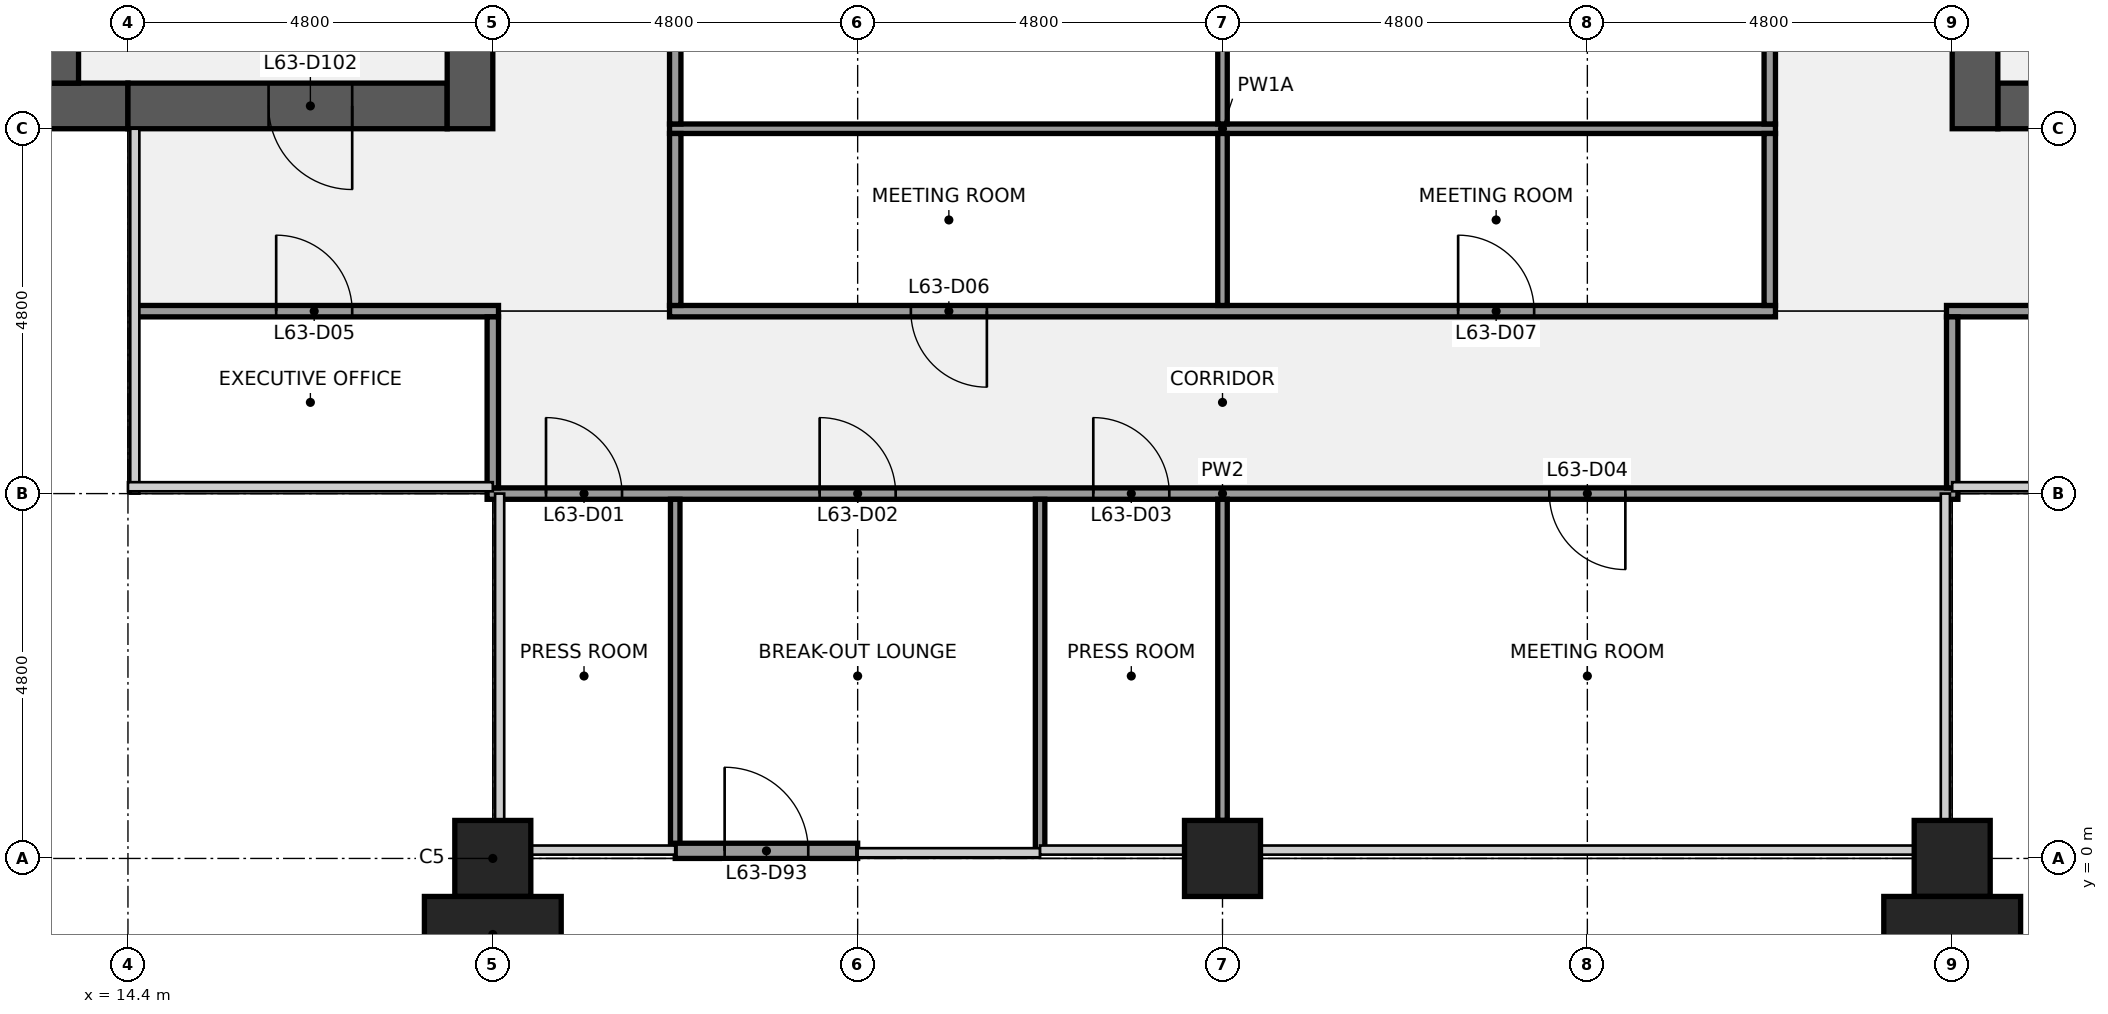
"""IFC4 building model, lengths in metres.
Left out: names, types, materials, properties, quantities, classifications, styles, units other than length and angle.
Written with IfcOpenShell. Run it as: python <this file> out.ifc"""

import sys

from ifc_helpers import new_model, si_unit, direction, frame, frame_2d, origin, origin_2d, place, context, subcontext, project, spatial, rectangle, extrude, element, fill, save


model = new_model("IFC4")
c1 = context("Model", 3, precision=1e-05, world=origin(), true_north=direction((0.0, 1.0)))
c2 = subcontext(c1, "Body", "Model", "MODEL_VIEW")
j1 = project(units=[si_unit("LENGTHUNIT", "METRE"), si_unit("PLANEANGLEUNIT", "RADIAN")], contexts=[c1])
p1 = place(None, origin())
s1 = spatial("IfcSite", under=j1, at=p1, CompositionType="ELEMENT")
p2 = place(p1, origin())
s2 = spatial("IfcBuilding", under=s1, at=p2, CompositionType="ELEMENT")
p3 = place(p2, frame((0.0, 0.0, 290.3)))
s3 = spatial("IfcBuildingStorey", under=s2, at=p3, CompositionType="ELEMENT", Elevation=290.3)
for number, where, z_axis, x_axis in (
    (1, (19.2, 0.0, 0.0), (0.0, 0.0, 1.0), (1.0, 0.0, 0.0)),
    (2, (28.8, 0.0, 0.0), (0.0, 0.0, 1.0), (1.0, 0.0, 0.0)),
    (3, (38.4, 0.0, 0.0), (0.0, 0.0, 1.0), (1.0, 0.0, 0.0)),
):
    element("IfcColumn", number, at=place(p3, frame(where, z_axis=z_axis, x_axis=x_axis)), inside=s3, PredefinedType="COLUMN", context=c2, shape_type="SweptSolid", body=[
        extrude(rectangle(XDim=1.0, YDim=1.0, at=origin_2d()), origin(), (0.0, 0.0, 1.0), 4.0),
    ])
p4 = place(p3, frame((14.4, 9.9, 0.0), z_axis=(0.0, 0.0, 1.0), x_axis=(-1.0, 0.0, 0.0)))
e4 = element("IfcWall", 4, at=p4, inside=s3, PredefinedType="SHEAR", context=c2, shape_type="SweptSolid", body=[
    extrude(rectangle(XDim=13.8, YDim=0.6, at=frame_2d((6.9, 0.0))), origin(), (0.0, 0.0, 1.0), 3.84),
])
p5 = place(p4, frame((6.3, 0.0, 0.9)))
e5 = element("IfcOpeningElement", 5, at=p5, cuts=e4, PredefinedType="OPENING", context=c2, shape_type="SweptSolid", body=[
    extrude(rectangle(XDim=1.8, YDim=1.5, at=frame_2d((0.9, 0.75))), frame((0.0, 0.31, 0.0), z_axis=(0.0, -1.0, 0.0), x_axis=(1.0, 0.0, 0.0)), (0.0, 0.0, 1.0), 0.62),
])
p6 = place(p4, frame((1.5, 0.0, 0.9)))
e6 = element("IfcOpeningElement", 6, at=p6, cuts=e4, PredefinedType="OPENING", context=c2, shape_type="SweptSolid", body=[
    extrude(rectangle(XDim=1.8, YDim=1.5, at=frame_2d((0.9, 0.75))), frame((0.0, 0.31, 0.0), z_axis=(0.0, -1.0, 0.0), x_axis=(1.0, 0.0, 0.0)), (0.0, 0.0, 1.0), 0.62),
])
p7 = place(p3, frame((18.6, 9.9, 0.0), z_axis=(0.0, 0.0, 1.0), x_axis=(-1.0, 0.0, 0.0)))
e7 = element("IfcWall", 7, at=p7, inside=s3, PredefinedType="SHEAR", context=c2, shape_type="SweptSolid", body=[
    extrude(rectangle(XDim=4.2, YDim=0.6, at=frame_2d((2.1, 0.0))), origin(), (0.0, 0.0, 1.0), 3.84),
])
p8 = place(p7, frame((1.25, 0.0, 0.0)))
e8 = element("IfcOpeningElement", 8, at=p8, cuts=e7, PredefinedType="OPENING", context=c2, shape_type="SweptSolid", body=[
    extrude(rectangle(XDim=1.1, YDim=2.1, at=frame_2d((0.55, 1.05))), frame((0.0, 0.31, 0.0), z_axis=(0.0, -1.0, 0.0), x_axis=(1.0, 0.0, 0.0)), (0.0, 0.0, 1.0), 0.62),
])
p9 = place(p3, frame((18.9, 38.4, 0.0), z_axis=(0.0, 0.0, 1.0), x_axis=(0.0, -1.0, 0.0)))
e9 = element("IfcWall", 9, at=p9, inside=s3, PredefinedType="SHEAR", context=c2, shape_type="SweptSolid", body=[
    extrude(rectangle(XDim=28.8, YDim=0.6, at=frame_2d((14.4, 0.0))), origin(), (0.0, 0.0, 1.0), 3.84),
])
p10 = place(p9, frame((18.3, 0.0, 0.0)))
e10 = element("IfcOpeningElement", 10, at=p10, cuts=e9, PredefinedType="OPENING", context=c2, shape_type="SweptSolid", body=[
    extrude(rectangle(XDim=1.8, YDim=2.1, at=frame_2d((0.9, 1.05))), frame((0.0, 0.31, 0.0), z_axis=(0.0, -1.0, 0.0), x_axis=(1.0, 0.0, 0.0)), (0.0, 0.0, 1.0), 0.62),
])
p11 = place(p9, frame((8.7, 0.0, 0.0)))
e11 = element("IfcOpeningElement", 11, at=p11, cuts=e9, PredefinedType="OPENING", context=c2, shape_type="SweptSolid", body=[
    extrude(rectangle(XDim=1.8, YDim=2.1, at=frame_2d((0.9, 1.05))), frame((0.0, 0.31, 0.0), z_axis=(0.0, -1.0, 0.0), x_axis=(1.0, 0.0, 0.0)), (0.0, 0.0, 1.0), 0.62),
])
p12 = place(p3, frame((6.25, 10.5, 0.0), z_axis=(0.0, 0.0, 1.0), x_axis=(1.0, 0.0, 0.0)))
e12 = element("IfcWall", 12, at=p12, inside=s3, PredefinedType="SHEAR", context=c2, shape_type="SweptSolid", body=[
    extrude(rectangle(XDim=7.5, YDim=0.6, at=frame_2d((3.75, 0.0))), origin(), (0.0, 0.0, 1.0), 3.84),
])
p13 = place(p3, frame((43.2, 9.9, 0.0), z_axis=(0.0, 0.0, 1.0), x_axis=(-1.0, 0.0, 0.0)))
e13 = element("IfcWall", 13, at=p13, inside=s3, PredefinedType="SHEAR", context=c2, shape_type="SweptSolid", body=[
    extrude(rectangle(XDim=4.2, YDim=0.6, at=frame_2d((2.1, 0.0))), origin(), (0.0, 0.0, 1.0), 3.84),
])
p14 = place(p13, frame((1.85, 0.0, 0.0)))
e14 = element("IfcOpeningElement", 14, at=p14, cuts=e13, PredefinedType="OPENING", context=c2, shape_type="SweptSolid", body=[
    extrude(rectangle(XDim=1.1, YDim=2.1, at=frame_2d((0.55, 1.05))), frame((0.0, 0.31, 0.0), z_axis=(0.0, -1.0, 0.0), x_axis=(1.0, 0.0, 0.0)), (0.0, 0.0, 1.0), 0.62),
])
p15 = place(p3, frame((38.7, 9.6, 0.0), z_axis=(0.0, 0.0, 1.0), x_axis=(0.0, 1.0, 0.0)))
e15 = element("IfcWall", 15, at=p15, inside=s3, PredefinedType="SHEAR", context=c2, shape_type="SweptSolid", body=[
    extrude(rectangle(XDim=28.8, YDim=0.6, at=frame_2d((14.4, 0.0))), origin(), (0.0, 0.0, 1.0), 3.84),
])
p16 = place(p15, frame((8.7, 0.0, 0.0)))
e16 = element("IfcOpeningElement", 16, at=p16, cuts=e15, PredefinedType="OPENING", context=c2, shape_type="SweptSolid", body=[
    extrude(rectangle(XDim=1.8, YDim=2.1, at=frame_2d((0.9, 1.05))), frame((0.0, 0.31, 0.0), z_axis=(0.0, -1.0, 0.0), x_axis=(1.0, 0.0, 0.0)), (0.0, 0.0, 1.0), 0.62),
])
p17 = place(p15, frame((18.3, 0.0, 0.0)))
e17 = element("IfcOpeningElement", 17, at=p17, cuts=e15, PredefinedType="OPENING", context=c2, shape_type="SweptSolid", body=[
    extrude(rectangle(XDim=1.8, YDim=2.1, at=frame_2d((0.9, 1.05))), frame((0.0, 0.31, 0.0), z_axis=(0.0, -1.0, 0.0), x_axis=(1.0, 0.0, 0.0)), (0.0, 0.0, 1.0), 0.62),
])
p18 = place(p3, frame((19.125, 4.8, 0.0), z_axis=(0.0, 0.0, 1.0), x_axis=(1.0, 0.0, 0.0)))
e18 = element("IfcWall", 18, at=p18, inside=s3, PredefinedType="PARTITIONING", context=c2, shape_type="SweptSolid", body=[
    extrude(rectangle(XDim=19.35, YDim=0.15, at=frame_2d((9.675, 0.0))), origin(), (0.0, 0.0, 1.0), 2.87),
])
p19 = place(p18, frame((0.775, 0.0, 0.0)))
e19 = element("IfcOpeningElement", 19, at=p19, cuts=e18, PredefinedType="OPENING", context=c2, shape_type="SweptSolid", body=[
    extrude(rectangle(XDim=1.0, YDim=2.1, at=frame_2d((0.5, 1.05))), frame((0.0, 0.085, 0.0), z_axis=(0.0, -1.0, 0.0), x_axis=(1.0, 0.0, 0.0)), (0.0, 0.0, 1.0), 0.17),
])
p20 = place(p18, frame((4.375, 0.0, 0.0)))
e20 = element("IfcOpeningElement", 20, at=p20, cuts=e18, PredefinedType="OPENING", context=c2, shape_type="SweptSolid", body=[
    extrude(rectangle(XDim=1.0, YDim=2.1, at=frame_2d((0.5, 1.05))), frame((0.0, 0.085, 0.0), z_axis=(0.0, -1.0, 0.0), x_axis=(1.0, 0.0, 0.0)), (0.0, 0.0, 1.0), 0.17),
])
p21 = place(p18, frame((7.975, 0.0, 0.0)))
e21 = element("IfcOpeningElement", 21, at=p21, cuts=e18, PredefinedType="OPENING", context=c2, shape_type="SweptSolid", body=[
    extrude(rectangle(XDim=1.0, YDim=2.1, at=frame_2d((0.5, 1.05))), frame((0.0, 0.085, 0.0), z_axis=(0.0, -1.0, 0.0), x_axis=(1.0, 0.0, 0.0)), (0.0, 0.0, 1.0), 0.17),
])
p22 = place(p18, frame((13.975, 0.0, 0.0)))
e22 = element("IfcOpeningElement", 22, at=p22, cuts=e18, PredefinedType="OPENING", context=c2, shape_type="SweptSolid", body=[
    extrude(rectangle(XDim=1.0, YDim=2.1, at=frame_2d((0.5, 1.05))), frame((0.0, 0.085, 0.0), z_axis=(0.0, -1.0, 0.0), x_axis=(1.0, 0.0, 0.0)), (0.0, 0.0, 1.0), 0.17),
])
p23 = place(p3, frame((14.5, 7.2, 0.0), z_axis=(0.0, 0.0, 1.0), x_axis=(1.0, 0.0, 0.0)))
e23 = element("IfcWall", 23, at=p23, inside=s3, PredefinedType="PARTITIONING", context=c2, shape_type="SweptSolid", body=[
    extrude(rectangle(XDim=4.775, YDim=0.15, at=frame_2d((2.387, 0.0))), origin(), (0.0, 0.0, 1.0), 2.87),
])
p24 = place(p23, frame((1.85, 0.0, 0.0)))
e24 = element("IfcOpeningElement", 24, at=p24, cuts=e23, PredefinedType="OPENING", context=c2, shape_type="SweptSolid", body=[
    extrude(rectangle(XDim=1.0, YDim=2.1, at=frame_2d((0.5, 1.05))), frame((0.0, 0.085, 0.0), z_axis=(0.0, -1.0, 0.0), x_axis=(1.0, 0.0, 0.0)), (0.0, 0.0, 1.0), 0.17),
])
p25 = place(p3, frame((21.525, 7.2, 0.0), z_axis=(0.0, 0.0, 1.0), x_axis=(1.0, 0.0, 0.0)))
e25 = element("IfcWall", 25, at=p25, inside=s3, PredefinedType="PARTITIONING", context=c2, shape_type="SweptSolid", body=[
    extrude(rectangle(XDim=14.55, YDim=0.15, at=frame_2d((7.275, 0.0))), origin(), (0.0, 0.0, 1.0), 2.87),
])
p26 = place(p25, frame((3.175, 0.0, 0.0)))
e26 = element("IfcOpeningElement", 26, at=p26, cuts=e25, PredefinedType="OPENING", context=c2, shape_type="SweptSolid", body=[
    extrude(rectangle(XDim=1.0, YDim=2.1, at=frame_2d((0.5, 1.05))), frame((0.0, 0.085, 0.0), z_axis=(0.0, -1.0, 0.0), x_axis=(1.0, 0.0, 0.0)), (0.0, 0.0, 1.0), 0.17),
])
p27 = place(p25, frame((10.375, 0.0, 0.0)))
e27 = element("IfcOpeningElement", 27, at=p27, cuts=e25, PredefinedType="OPENING", context=c2, shape_type="SweptSolid", body=[
    extrude(rectangle(XDim=1.0, YDim=2.1, at=frame_2d((0.5, 1.05))), frame((0.0, 0.085, 0.0), z_axis=(0.0, -1.0, 0.0), x_axis=(1.0, 0.0, 0.0)), (0.0, 0.0, 1.0), 0.17),
])
p28 = place(p3, frame((38.325, 7.2, 0.0), z_axis=(0.0, 0.0, 1.0), x_axis=(1.0, 0.0, 0.0)))
e28 = element("IfcWall", 28, at=p28, inside=s3, PredefinedType="PARTITIONING", context=c2, shape_type="SweptSolid", body=[
    extrude(rectangle(XDim=4.775, YDim=0.15, at=frame_2d((2.388, 0.0))), origin(), (0.0, 0.0, 1.0), 2.87),
])
p29 = place(p28, frame((1.925, 0.0, 0.0)))
e29 = element("IfcOpeningElement", 29, at=p29, cuts=e28, PredefinedType="OPENING", context=c2, shape_type="SweptSolid", body=[
    extrude(rectangle(XDim=1.0, YDim=2.1, at=frame_2d((0.5, 1.05))), frame((0.0, 0.085, 0.0), z_axis=(0.0, -1.0, 0.0), x_axis=(1.0, 0.0, 0.0)), (0.0, 0.0, 1.0), 0.17),
])
p30 = place(p3, frame((21.525, 9.6, 0.0), z_axis=(0.0, 0.0, 1.0), x_axis=(1.0, 0.0, 0.0)))
e30 = element("IfcWall", 30, at=p30, inside=s3, PredefinedType="PARTITIONING", context=c2, shape_type="SweptSolid", body=[
    extrude(rectangle(XDim=14.55, YDim=0.125, at=frame_2d((7.275, 0.0))), origin(), (0.0, 0.0, 1.0), 2.87),
])
p31 = place(p3, frame((19.2, 4.875, 0.0), z_axis=(0.0, 0.0, 1.0), x_axis=(0.0, 1.0, 0.0)))
e31 = element("IfcWall", 31, at=p31, inside=s3, PredefinedType="PARTITIONING", context=c2, shape_type="SweptSolid", body=[
    extrude(rectangle(XDim=2.25, YDim=0.15, at=frame_2d((1.125, 0.0))), origin(), (0.0, 0.0, 1.0), 2.87),
])
p32 = place(p3, frame((21.6, 0.1, 0.0), z_axis=(0.0, 0.0, 1.0), x_axis=(0.0, 1.0, 0.0)))
e32 = element("IfcWall", 32, at=p32, inside=s3, PredefinedType="PARTITIONING", context=c2, shape_type="SweptSolid", body=[
    extrude(rectangle(XDim=4.625, YDim=0.125, at=frame_2d((2.312, 0.0))), origin(), (0.0, 0.0, 1.0), 2.87),
])
p33 = place(p3, frame((21.6, 7.275, 0.0), z_axis=(0.0, 0.0, 1.0), x_axis=(0.0, 1.0, 0.0)))
e33 = element("IfcWall", 33, at=p33, inside=s3, PredefinedType="PARTITIONING", context=c2, shape_type="SweptSolid", body=[
    extrude(rectangle(XDim=2.263, YDim=0.15, at=frame_2d((1.131, 0.0))), origin(), (0.0, 0.0, 1.0), 2.87),
])
p34 = place(p3, frame((21.6, 9.663, 0.0), z_axis=(0.0, 0.0, 1.0), x_axis=(0.0, 1.0, 0.0)))
e34 = element("IfcWall", 34, at=p34, inside=s3, PredefinedType="PARTITIONING", context=c2, shape_type="SweptSolid", body=[
    extrude(rectangle(XDim=9.475, YDim=0.15, at=frame_2d((4.737, 0.0))), origin(), (0.0, 0.0, 1.0), 2.87),
])
p35 = place(p34, frame((4.238, 0.0, 0.0)))
e35 = element("IfcOpeningElement", 35, at=p35, cuts=e34, PredefinedType="OPENING", context=c2, shape_type="SweptSolid", body=[
    extrude(rectangle(XDim=1.0, YDim=2.1, at=frame_2d((0.5, 1.05))), frame((0.0, 0.085, 0.0), z_axis=(0.0, -1.0, 0.0), x_axis=(1.0, 0.0, 0.0)), (0.0, 0.0, 1.0), 0.17),
])
p36 = place(p3, frame((26.4, 0.1, 0.0), z_axis=(0.0, 0.0, 1.0), x_axis=(0.0, 1.0, 0.0)))
e36 = element("IfcWall", 36, at=p36, inside=s3, PredefinedType="PARTITIONING", context=c2, shape_type="SweptSolid", body=[
    extrude(rectangle(XDim=4.625, YDim=0.125, at=frame_2d((2.312, 0.0))), origin(), (0.0, 0.0, 1.0), 2.87),
])
p37 = place(p3, frame((28.8, 0.5, 0.0), z_axis=(0.0, 0.0, 1.0), x_axis=(0.0, 1.0, 0.0)))
e37 = element("IfcWall", 37, at=p37, inside=s3, PredefinedType="PARTITIONING", context=c2, shape_type="SweptSolid", body=[
    extrude(rectangle(XDim=4.225, YDim=0.125, at=frame_2d((2.113, 0.0))), origin(), (0.0, 0.0, 1.0), 2.87),
])
p38 = place(p3, frame((28.8, 7.275, 0.0), z_axis=(0.0, 0.0, 1.0), x_axis=(0.0, 1.0, 0.0)))
e38 = element("IfcWall", 38, at=p38, inside=s3, PredefinedType="PARTITIONING", context=c2, shape_type="SweptSolid", body=[
    extrude(rectangle(XDim=2.263, YDim=0.125, at=frame_2d((1.131, 0.0))), origin(), (0.0, 0.0, 1.0), 2.87),
])
p39 = place(p3, frame((28.8, 9.663, 0.0), z_axis=(0.0, 0.0, 1.0), x_axis=(0.0, 1.0, 0.0)))
e39 = element("IfcWall", 39, at=p39, inside=s3, PredefinedType="PARTITIONING", context=c2, shape_type="SweptSolid", body=[
    extrude(rectangle(XDim=9.475, YDim=0.125, at=frame_2d((4.737, 0.0))), origin(), (0.0, 0.0, 1.0), 2.87),
])
p40 = place(p3, frame((36.0, 7.275, 0.0), z_axis=(0.0, 0.0, 1.0), x_axis=(0.0, 1.0, 0.0)))
e40 = element("IfcWall", 40, at=p40, inside=s3, PredefinedType="PARTITIONING", context=c2, shape_type="SweptSolid", body=[
    extrude(rectangle(XDim=2.263, YDim=0.15, at=frame_2d((1.131, 0.0))), origin(), (0.0, 0.0, 1.0), 2.87),
])
p41 = place(p3, frame((36.0, 9.663, 0.0), z_axis=(0.0, 0.0, 1.0), x_axis=(0.0, 1.0, 0.0)))
e41 = element("IfcWall", 41, at=p41, inside=s3, PredefinedType="PARTITIONING", context=c2, shape_type="SweptSolid", body=[
    extrude(rectangle(XDim=9.475, YDim=0.15, at=frame_2d((4.737, 0.0))), origin(), (0.0, 0.0, 1.0), 2.87),
])
p42 = place(p41, frame((4.238, 0.0, 0.0)))
e42 = element("IfcOpeningElement", 42, at=p42, cuts=e41, PredefinedType="OPENING", context=c2, shape_type="SweptSolid", body=[
    extrude(rectangle(XDim=1.0, YDim=2.1, at=frame_2d((0.5, 1.05))), frame((0.0, 0.085, 0.0), z_axis=(0.0, -1.0, 0.0), x_axis=(1.0, 0.0, 0.0)), (0.0, 0.0, 1.0), 0.17),
])
p43 = place(p3, frame((38.4, 4.875, 0.0), z_axis=(0.0, 0.0, 1.0), x_axis=(0.0, 1.0, 0.0)))
e43 = element("IfcWall", 43, at=p43, inside=s3, PredefinedType="PARTITIONING", context=c2, shape_type="SweptSolid", body=[
    extrude(rectangle(XDim=2.25, YDim=0.15, at=frame_2d((1.125, 0.0))), origin(), (0.0, 0.0, 1.0), 2.87),
])
p44 = place(p3, frame((21.6, 0.1, 0.0), z_axis=(0.0, 0.0, 1.0), x_axis=(1.0, 0.0, 0.0)))
e44 = element("IfcWall", 44, at=p44, inside=s3, PredefinedType="SOLIDWALL", context=c2, shape_type="SweptSolid", body=[
    extrude(rectangle(XDim=2.4, YDim=0.2, at=frame_2d((1.2, 0.0))), origin(), (0.0, 0.0, 1.0), 3.314),
])
p45 = place(p44, frame((0.65, 0.0, 0.0)))
e45 = element("IfcOpeningElement", 45, at=p45, cuts=e44, PredefinedType="OPENING", context=c2, shape_type="SweptSolid", body=[
    extrude(rectangle(XDim=1.1, YDim=2.1, at=frame_2d((0.55, 1.05))), frame((0.0, 0.11, 0.0), z_axis=(0.0, -1.0, 0.0), x_axis=(1.0, 0.0, 0.0)), (0.0, 0.0, 1.0), 0.22),
])
for number, where, z_axis, x_axis in (
    (46, (19.2, -1.0, 0.0), (0.0, 0.0, 1.0), (1.0, 0.0, 0.0)),
    (47, (38.4, -1.0, 0.0), (0.0, 0.0, 1.0), (1.0, 0.0, 0.0)),
):
    element("IfcColumn", number, at=place(p3, frame(where, z_axis=z_axis, x_axis=x_axis)), inside=s3, PredefinedType="PILASTER", context=c2, shape_type="SweptSolid", body=[
        extrude(rectangle(XDim=1.8, YDim=1.0, at=origin_2d()), origin(), (0.0, 0.0, 1.0), 4.0),
    ])
p46 = place(p8, origin())
e48 = element("IfcDoor", 48, at=p46, inside=s3, OperationType="SINGLE_SWING_LEFT", PredefinedType="DOOR", context=c2, shape_type="SweptSolid", body=[
    extrude(rectangle(XDim=1.1, YDim=2.1, at=frame_2d((0.55, 1.05))), frame((0.0, 0.025, 0.0), z_axis=(0.0, -1.0, 0.0), x_axis=(1.0, 0.0, 0.0)), (0.0, 0.0, 1.0), 0.05),
])
fill(e8, e48)
p47 = place(p19, origin())
e49 = element("IfcDoor", 49, at=p47, inside=s3, OperationType="SINGLE_SWING_LEFT", PredefinedType="DOOR", context=c2, shape_type="SweptSolid", body=[
    extrude(rectangle(XDim=1.0, YDim=2.1, at=frame_2d((0.5, 1.05))), frame((0.0, 0.025, 0.0), z_axis=(0.0, -1.0, 0.0), x_axis=(1.0, 0.0, 0.0)), (0.0, 0.0, 1.0), 0.05),
])
fill(e19, e49)
p48 = place(p20, origin())
e50 = element("IfcDoor", 50, at=p48, inside=s3, OperationType="SINGLE_SWING_LEFT", PredefinedType="DOOR", context=c2, shape_type="SweptSolid", body=[
    extrude(rectangle(XDim=1.0, YDim=2.1, at=frame_2d((0.5, 1.05))), frame((0.0, 0.025, 0.0), z_axis=(0.0, -1.0, 0.0), x_axis=(1.0, 0.0, 0.0)), (0.0, 0.0, 1.0), 0.05),
])
fill(e20, e50)
p49 = place(p21, origin())
e51 = element("IfcDoor", 51, at=p49, inside=s3, OperationType="SINGLE_SWING_LEFT", PredefinedType="DOOR", context=c2, shape_type="SweptSolid", body=[
    extrude(rectangle(XDim=1.0, YDim=2.1, at=frame_2d((0.5, 1.05))), frame((0.0, 0.025, 0.0), z_axis=(0.0, -1.0, 0.0), x_axis=(1.0, 0.0, 0.0)), (0.0, 0.0, 1.0), 0.05),
])
fill(e21, e51)
p50 = place(p22, origin())
e52 = element("IfcDoor", 52, at=p50, inside=s3, OperationType="SINGLE_SWING_RIGHT", PredefinedType="DOOR", context=c2, shape_type="SweptSolid", body=[
    extrude(rectangle(XDim=1.0, YDim=2.1, at=frame_2d((0.5, 1.05))), frame((0.0, 0.025, 0.0), z_axis=(0.0, -1.0, 0.0), x_axis=(1.0, 0.0, 0.0)), (0.0, 0.0, 1.0), 0.05),
])
fill(e22, e52)
p51 = place(p24, origin())
e53 = element("IfcDoor", 53, at=p51, inside=s3, OperationType="SINGLE_SWING_LEFT", PredefinedType="DOOR", context=c2, shape_type="SweptSolid", body=[
    extrude(rectangle(XDim=1.0, YDim=2.1, at=frame_2d((0.5, 1.05))), frame((0.0, 0.025, 0.0), z_axis=(0.0, -1.0, 0.0), x_axis=(1.0, 0.0, 0.0)), (0.0, 0.0, 1.0), 0.05),
])
fill(e24, e53)
p52 = place(p26, origin())
e54 = element("IfcDoor", 54, at=p52, inside=s3, OperationType="SINGLE_SWING_RIGHT", PredefinedType="DOOR", context=c2, shape_type="SweptSolid", body=[
    extrude(rectangle(XDim=1.0, YDim=2.1, at=frame_2d((0.5, 1.05))), frame((0.0, 0.025, 0.0), z_axis=(0.0, -1.0, 0.0), x_axis=(1.0, 0.0, 0.0)), (0.0, 0.0, 1.0), 0.05),
])
fill(e26, e54)
p53 = place(p27, origin())
e55 = element("IfcDoor", 55, at=p53, inside=s3, OperationType="SINGLE_SWING_LEFT", PredefinedType="DOOR", context=c2, shape_type="SweptSolid", body=[
    extrude(rectangle(XDim=1.0, YDim=2.1, at=frame_2d((0.5, 1.05))), frame((0.0, 0.025, 0.0), z_axis=(0.0, -1.0, 0.0), x_axis=(1.0, 0.0, 0.0)), (0.0, 0.0, 1.0), 0.05),
])
fill(e27, e55)
p54 = place(p45, origin())
e56 = element("IfcDoor", 56, at=p54, inside=s3, OperationType="SINGLE_SWING_LEFT", PredefinedType="DOOR", context=c2, shape_type="SweptSolid", body=[
    extrude(rectangle(XDim=1.1, YDim=2.1, at=frame_2d((0.55, 1.05))), frame((0.0, 0.025, 0.0), z_axis=(0.0, -1.0, 0.0), x_axis=(1.0, 0.0, 0.0)), (0.0, 0.0, 1.0), 0.05),
])
fill(e45, e56)
save(model, sys.argv[1])
